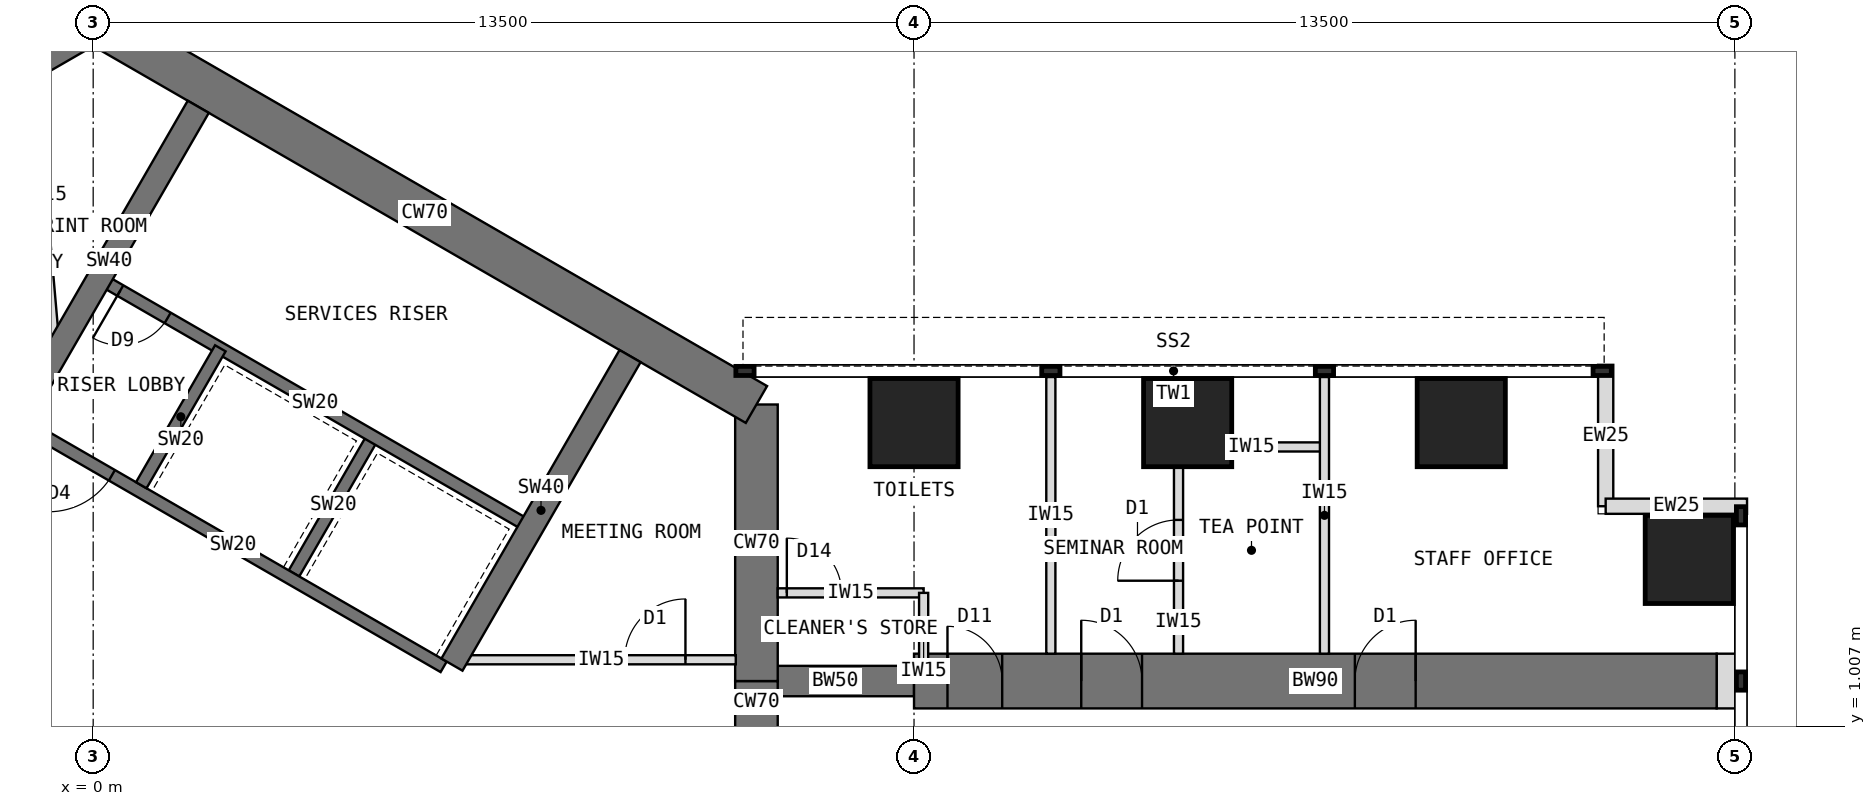
"""IFC4 building model, lengths in metres.
Left out: names, types, materials, properties, quantities, classifications, styles, units other than length and angle.
Written with IfcOpenShell. Run it as: python <this file> out.ifc"""

import sys

from ifc_helpers import new_model, si_unit, direction, frame, frame_2d, origin, origin_2d, place, context, subcontext, project, spatial, rectangle, extrude, element, fill, save


model = new_model("IFC4")
c1 = context("Model", 3, precision=1e-05, world=origin(), true_north=direction((0.0, 1.0)))
c2 = subcontext(c1, "Body", "Model", "MODEL_VIEW")
j1 = project(units=[si_unit("LENGTHUNIT", "METRE"), si_unit("PLANEANGLEUNIT", "RADIAN")], contexts=[c1])
p1 = place(None, origin())
s1 = spatial("IfcSite", under=j1, at=p1, CompositionType="ELEMENT")
p2 = place(p1, origin())
s2 = spatial("IfcBuilding", under=s1, at=p2, CompositionType="ELEMENT")
p3 = place(p2, frame((0.0, 0.0, 64.5)))
s3 = spatial("IfcBuildingStorey", under=s2, at=p3, CompositionType="ELEMENT", Elevation=64.5)
p4 = place(p3, frame((10.908, -1.75, 0.0), z_axis=(0.0, 0.0, 1.0), x_axis=(0.0, 1.0, 0.0)))
e1 = element("IfcWall", 1, at=p4, inside=s3, PredefinedType="SHEAR", context=c2, shape_type="SweptSolid", body=[
    extrude(rectangle(XDim=3.5, YDim=0.7, at=frame_2d((1.75, 0.0))), origin(), (0.0, 0.0, 1.0), 4.0),
])
p5 = place(p4, frame((0.85, 0.0, 0.0)))
e2 = element("IfcOpeningElement", 2, at=p5, cuts=e1, PredefinedType="OPENING", context=c2, shape_type="SweptSolid", body=[
    extrude(rectangle(XDim=1.8, YDim=2.1, at=frame_2d((0.9, 1.05))), frame((0.0, 0.36, 0.0), z_axis=(0.0, -1.0, 0.0), x_axis=(1.0, 0.0, 0.0)), (0.0, 0.0, 1.0), 0.72),
])
p6 = place(p3, frame((10.908, 1.75, 0.0), z_axis=(0.0, 0.0, 1.0), x_axis=(0.0, 1.0, 0.0)))
e3 = element("IfcWall", 3, at=p6, inside=s3, PredefinedType="SHEAR", context=c2, shape_type="SweptSolid", body=[
    extrude(rectangle(XDim=4.548, YDim=0.7, at=frame_2d((2.274, 0.0))), origin(), (0.0, 0.0, 1.0), 4.0),
])
p7 = place(p3, frame((10.908, 6.298, 0.0), z_axis=(0.0, 0.0, 1.0), x_axis=(-0.866021940709, 0.500005998175, 0.0)))
e4 = element("IfcWall", 4, at=p7, inside=s3, PredefinedType="SHEAR", context=c2, shape_type="SweptSolid", body=[
    extrude(rectangle(XDim=12.596, YDim=0.7, at=frame_2d((6.298, 0.0))), origin(), (0.0, 0.0, 1.0), 4.0),
])
p8 = place(p3, frame((0.0, 12.596, 0.0), z_axis=(0.0, 0.0, 1.0), x_axis=(-0.866011268655, -0.500024481964, 0.0)))
e5 = element("IfcWall", 5, at=p8, inside=s3, PredefinedType="SHEAR", context=c2, shape_type="SweptSolid", body=[
    extrude(rectangle(XDim=4.548, YDim=0.7, at=frame_2d((2.274, 0.0))), origin(), (0.0, 0.0, 1.0), 4.0),
])
p9 = place(p3, frame((10.908, 1.75, 0.0), z_axis=(0.0, 0.0, 1.0), x_axis=(1.0, 0.0, 0.0)))
e6 = element("IfcWall", 6, at=p9, inside=s3, PredefinedType="SHEAR", context=c2, shape_type="SweptSolid", body=[
    extrude(rectangle(XDim=2.592, YDim=0.5, at=frame_2d((1.296, 0.0))), origin(), (0.0, 0.0, 1.0), 4.0),
])
p10 = place(p3, frame((13.5, 1.75, 0.0), z_axis=(0.0, 0.0, 1.0), x_axis=(1.0, 0.0, 0.0)))
e7 = element("IfcWall", 7, at=p10, inside=s3, PredefinedType="SHEAR", context=c2, shape_type="SweptSolid", body=[
    extrude(rectangle(XDim=13.2, YDim=0.9, at=frame_2d((6.6, 0.0))), origin(), (0.0, 0.0, 1.0), 4.0),
])
p11 = place(p10, frame((0.55, 0.0, 0.0)))
e8 = element("IfcOpeningElement", 8, at=p11, cuts=e7, PredefinedType="OPENING", context=c2, shape_type="SweptSolid", body=[
    extrude(rectangle(XDim=0.9, YDim=2.1, at=frame_2d((0.45, 1.05))), frame((0.0, 0.46, 0.0), z_axis=(0.0, -1.0, 0.0), x_axis=(1.0, 0.0, 0.0)), (0.0, 0.0, 1.0), 0.92),
])
p12 = place(p10, frame((2.75, 0.0, 0.0)))
e9 = element("IfcOpeningElement", 9, at=p12, cuts=e7, PredefinedType="OPENING", context=c2, shape_type="SweptSolid", body=[
    extrude(rectangle(XDim=1.0, YDim=2.1, at=frame_2d((0.5, 1.05))), frame((0.0, 0.46, 0.0), z_axis=(0.0, -1.0, 0.0), x_axis=(1.0, 0.0, 0.0)), (0.0, 0.0, 1.0), 0.92),
])
p13 = place(p10, frame((7.25, 0.0, 0.0)))
e10 = element("IfcOpeningElement", 10, at=p13, cuts=e7, PredefinedType="OPENING", context=c2, shape_type="SweptSolid", body=[
    extrude(rectangle(XDim=1.0, YDim=2.1, at=frame_2d((0.5, 1.05))), frame((0.0, 0.46, 0.0), z_axis=(0.0, -1.0, 0.0), x_axis=(1.0, 0.0, 0.0)), (0.0, 0.0, 1.0), 0.92),
])
for number, where, z_axis, x_axis in (
    (11, (13.5, 6.0, 0.0), (0.0, 0.0, 1.0), (1.0, 0.0, 0.0)),
    (12, (18.0, 6.0, 0.0), (0.0, 0.0, 1.0), (1.0, 0.0, 0.0)),
    (13, (22.5, 6.0, 0.0), (0.0, 0.0, 1.0), (1.0, 0.0, 0.0)),
    (14, (26.25, 3.75, 0.0), (0.0, 0.0, 1.0), (1.0, 0.0, 0.0)),
):
    element("IfcColumn", number, at=place(p3, frame(where, z_axis=z_axis, x_axis=x_axis)), inside=s3, PredefinedType="COLUMN", context=c2, shape_type="SweptSolid", body=[
        extrude(rectangle(XDim=1.45, YDim=1.45, at=origin_2d()), origin(), (0.0, 0.0, 1.0), 4.0),
    ])
for number, where, z_axis, x_axis in (
    (15, (24.875, 6.95, 0.0), (0.0, 0.0, 1.0), (0.0, -1.0, 0.0)),
    (16, (24.875, 4.625, 0.0), (0.0, 0.0, 1.0), (1.0, 0.0, 0.0)),
):
    element("IfcWall", number, at=place(p3, frame(where, z_axis=z_axis, x_axis=x_axis)), inside=s3, PredefinedType="STANDARD", context=c2, shape_type="SweptSolid", body=[
        extrude(rectangle(XDim=2.325, YDim=0.25, at=frame_2d((1.163, 0.0))), origin(), (0.0, 0.0, 1.0), 3.8),
    ])
p14 = place(p3, frame((26.7, 1.75, 0.0), z_axis=(0.0, 0.0, 1.0), x_axis=(1.0, 0.0, 0.0)))
e17 = element("IfcWall", 17, at=p14, inside=s3, PredefinedType="PARTITIONING", context=c2, shape_type="SweptSolid", body=[
    extrude(rectangle(XDim=0.31, YDim=0.9, at=frame_2d((0.155, 0.0))), origin(), (0.0, 0.0, 1.0), 3.8),
])
p15 = place(p3, frame((5.764, 1.984, 0.0), z_axis=(0.0, 0.0, 1.0), x_axis=(-0.866026010844, 0.49999894854, 0.0)))
e18 = element("IfcWall", 18, at=p15, inside=s3, PredefinedType="SHEAR", context=c2, shape_type="SweptSolid", body=[
    extrude(rectangle(XDim=8.0, YDim=0.2, at=frame_2d((4.0, 0.0))), origin(), (0.0, 0.0, 1.0), 4.0),
])
p16 = place(p15, frame((6.3, 0.0, 0.0)))
e19 = element("IfcOpeningElement", 19, at=p16, cuts=e18, PredefinedType="OPENING", context=c2, shape_type="SweptSolid", body=[
    extrude(rectangle(XDim=1.2, YDim=2.1, at=frame_2d((0.6, 1.05))), frame((0.0, 0.11, 0.0), z_axis=(0.0, -1.0, 0.0), x_axis=(1.0, 0.0, 0.0)), (0.0, 0.0, 1.0), 0.22),
])
for number, where, z_axis, x_axis in (
    (20, (3.303, 3.52, 0.0), (0.0, 0.0, 1.0), (0.5, 0.866, 0.0)),
    (21, (0.791, 4.97, 0.0), (0.0, 0.0, 1.0), (0.5, 0.866, 0.0)),
):
    element("IfcWall", number, at=place(p3, frame(where, z_axis=z_axis, x_axis=x_axis)), inside=s3, PredefinedType="SHEAR", context=c2, shape_type="SweptSolid", body=[
        extrude(rectangle(XDim=2.6, YDim=0.2, at=frame_2d((1.3, 0.0))), origin(), (0.0, 0.0, 1.0), 4.0),
    ])
p17 = place(p3, frame((7.114, 4.322, 0.0), z_axis=(0.0, 0.0, 1.0), x_axis=(-0.866026010844, 0.49999894854, 0.0)))
e22 = element("IfcWall", 22, at=p17, inside=s3, PredefinedType="SHEAR", context=c2, shape_type="SweptSolid", body=[
    extrude(rectangle(XDim=8.0, YDim=0.2, at=frame_2d((4.0, 0.0))), origin(), (0.0, 0.0, 1.0), 4.0),
])
p18 = place(p17, frame((6.8, 0.0, 0.0)))
e23 = element("IfcOpeningElement", 23, at=p18, cuts=e22, PredefinedType="OPENING", context=c2, shape_type="SweptSolid", body=[
    extrude(rectangle(XDim=0.9, YDim=2.1, at=frame_2d((0.45, 1.05))), frame((0.0, 0.11, 0.0), z_axis=(0.0, -1.0, 0.0), x_axis=(1.0, 0.0, 0.0)), (0.0, 0.0, 1.0), 0.22),
])
for number, where, z_axis, x_axis in (
    (24, (-1.201, 6.12, 0.0), (0.0, 0.0, 1.0), (0.5, 0.866, 0.0)),
    (25, (5.901, 2.02, 0.0), (0.0, 0.0, 1.0), (0.5, 0.866, 0.0)),
):
    element("IfcWall", number, at=place(p3, frame(where, z_axis=z_axis, x_axis=x_axis)), inside=s3, PredefinedType="SHEAR", context=c2, shape_type="SweptSolid", body=[
        extrude(rectangle(XDim=5.858, YDim=0.4, at=frame_2d((2.929, 0.0))), origin(), (0.0, 0.0, 1.0), 4.0),
    ])
for number, where, z_axis, x_axis in (
    (26, (15.75, 2.2, 0.0), (0.0, 0.0, 1.0), (0.0, 1.0, 0.0)),
    (27, (20.25, 2.2, 0.0), (0.0, 0.0, 1.0), (0.0, 1.0, 0.0)),
):
    element("IfcWall", number, at=place(p3, frame(where, z_axis=z_axis, x_axis=x_axis)), inside=s3, PredefinedType="PARTITIONING", context=c2, shape_type="SweptSolid", body=[
        extrude(rectangle(XDim=4.55, YDim=0.15, at=frame_2d((2.275, 0.0))), origin(), (0.0, 0.0, 1.0), 3.8),
    ])
p19 = place(p3, frame((17.85, 5.6, 0.0), z_axis=(0.0, 0.0, 1.0), x_axis=(1.0, 0.0, 0.0)))
e28 = element("IfcWall", 28, at=p19, inside=s3, PredefinedType="PARTITIONING", context=c2, shape_type="SweptSolid", body=[
    extrude(rectangle(XDim=2.4, YDim=0.15, at=frame_2d((1.2, 0.0))), origin(), (0.0, 0.0, 1.0), 3.8),
])
p20 = place(p3, frame((17.85, 2.2, 0.0), z_axis=(0.0, 0.0, 1.0), x_axis=(0.0, 1.0, 0.0)))
e29 = element("IfcWall", 29, at=p20, inside=s3, PredefinedType="PARTITIONING", context=c2, shape_type="SweptSolid", body=[
    extrude(rectangle(XDim=3.4, YDim=0.15, at=frame_2d((1.7, 0.0))), origin(), (0.0, 0.0, 1.0), 3.8),
])
p21 = place(p20, frame((1.2, 0.0, 0.0)))
e30 = element("IfcOpeningElement", 30, at=p21, cuts=e29, PredefinedType="OPENING", context=c2, shape_type="SweptSolid", body=[
    extrude(rectangle(XDim=1.0, YDim=2.1, at=frame_2d((0.5, 1.05))), frame((0.0, 0.085, 0.0), z_axis=(0.0, -1.0, 0.0), x_axis=(1.0, 0.0, 0.0)), (0.0, 0.0, 1.0), 0.17),
])
p22 = place(p3, frame((11.258, 3.2, 0.0), z_axis=(0.0, 0.0, 1.0), x_axis=(1.0, 0.0, 0.0)))
e31 = element("IfcWall", 31, at=p22, inside=s3, PredefinedType="PARTITIONING", context=c2, shape_type="SweptSolid", body=[
    extrude(rectangle(XDim=2.4, YDim=0.15, at=frame_2d((1.2, 0.0))), origin(), (0.0, 0.0, 1.0), 3.8),
])
p23 = place(p22, frame((0.15, 0.0, 0.0)))
e32 = element("IfcOpeningElement", 32, at=p23, cuts=e31, PredefinedType="OPENING", context=c2, shape_type="SweptSolid", body=[
    extrude(rectangle(XDim=0.9, YDim=2.1, at=frame_2d((0.45, 1.05))), frame((0.0, 0.085, 0.0), z_axis=(0.0, -1.0, 0.0), x_axis=(1.0, 0.0, 0.0)), (0.0, 0.0, 1.0), 0.17),
])
p24 = place(p3, frame((13.658, 2.0, 0.0), z_axis=(0.0, 0.0, 1.0), x_axis=(0.0, 1.0, 0.0)))
e33 = element("IfcWall", 33, at=p24, inside=s3, PredefinedType="PARTITIONING", context=c2, shape_type="SweptSolid", body=[
    extrude(rectangle(XDim=1.2, YDim=0.15, at=frame_2d((0.6, 0.0))), origin(), (0.0, 0.0, 1.0), 3.8),
])
p25 = place(p3, frame((6.143, 2.1, 0.0), z_axis=(0.0, 0.0, 1.0), x_axis=(1.0, 0.0, 0.0)))
e34 = element("IfcWall", 34, at=p25, inside=s3, PredefinedType="PARTITIONING", context=c2, shape_type="SweptSolid", body=[
    extrude(rectangle(XDim=4.426, YDim=0.15, at=frame_2d((2.213, 0.0))), origin(), (0.0, 0.0, 1.0), 3.8),
])
p26 = place(p25, frame((2.598, 0.0, 0.0)))
e35 = element("IfcOpeningElement", 35, at=p26, cuts=e34, PredefinedType="OPENING", context=c2, shape_type="SweptSolid", body=[
    extrude(rectangle(XDim=1.0, YDim=2.1, at=frame_2d((0.5, 1.05))), frame((0.0, 0.085, 0.0), z_axis=(0.0, -1.0, 0.0), x_axis=(1.0, 0.0, 0.0)), (0.0, 0.0, 1.0), 0.17),
])
p27 = place(p3, frame((-0.618, 7.129, 0.0), z_axis=(0.0, 0.0, 1.0), x_axis=(-0.086409450071, 0.996259708579, 0.0)))
e36 = element("IfcWall", 36, at=p27, inside=s3, PredefinedType="PARTITIONING", context=c2, shape_type="SweptSolid", body=[
    extrude(rectangle(XDim=4.498, YDim=0.15, at=frame_2d((2.249, 0.0))), origin(), (0.0, 0.0, 1.0), 3.8),
])
p28 = place(p27, frame((2.648, 0.0, 0.0)))
e37 = element("IfcOpeningElement", 37, at=p28, cuts=e36, PredefinedType="OPENING", context=c2, shape_type="SweptSolid", body=[
    extrude(rectangle(XDim=1.0, YDim=2.1, at=frame_2d((0.5, 1.05))), frame((0.0, 0.085, 0.0), z_axis=(0.0, -1.0, 0.0), x_axis=(1.0, 0.0, 0.0)), (0.0, 0.0, 1.0), 0.17),
])
p29 = place(p16, origin())
e38 = element("IfcDoor", 38, at=p29, inside=s3, OperationType="SINGLE_SWING_RIGHT", PredefinedType="DOOR", context=c2, shape_type="SweptSolid", body=[
    extrude(rectangle(XDim=1.2, YDim=2.1, at=frame_2d((0.6, 1.05))), frame((0.0, 0.025, 0.0), z_axis=(0.0, -1.0, 0.0), x_axis=(1.0, 0.0, 0.0)), (0.0, 0.0, 1.0), 0.05),
])
fill(e19, e38)
p30 = place(p18, origin())
e39 = element("IfcDoor", 39, at=p30, inside=s3, OperationType="SINGLE_SWING_RIGHT", PredefinedType="DOOR", context=c2, shape_type="SweptSolid", body=[
    extrude(rectangle(XDim=0.9, YDim=2.1, at=frame_2d((0.45, 1.05))), frame((0.0, 0.025, 0.0), z_axis=(0.0, -1.0, 0.0), x_axis=(1.0, 0.0, 0.0)), (0.0, 0.0, 1.0), 0.05),
])
fill(e23, e39)
p31 = place(p21, origin())
e40 = element("IfcDoor", 40, at=p31, inside=s3, OperationType="SINGLE_SWING_LEFT", PredefinedType="DOOR", context=c2, shape_type="SweptSolid", body=[
    extrude(rectangle(XDim=1.0, YDim=2.1, at=frame_2d((0.5, 1.05))), frame((0.0, 0.025, 0.0), z_axis=(0.0, -1.0, 0.0), x_axis=(1.0, 0.0, 0.0)), (0.0, 0.0, 1.0), 0.05),
])
fill(e30, e40)
p32 = place(p23, origin())
e41 = element("IfcDoor", 41, at=p32, inside=s3, OperationType="SINGLE_SWING_LEFT", PredefinedType="DOOR", context=c2, shape_type="SweptSolid", body=[
    extrude(rectangle(XDim=0.9, YDim=2.1, at=frame_2d((0.45, 1.05))), frame((0.0, 0.025, 0.0), z_axis=(0.0, -1.0, 0.0), x_axis=(1.0, 0.0, 0.0)), (0.0, 0.0, 1.0), 0.05),
])
fill(e32, e41)
p33 = place(p26, origin())
e42 = element("IfcDoor", 42, at=p33, inside=s3, OperationType="SINGLE_SWING_RIGHT", PredefinedType="DOOR", context=c2, shape_type="SweptSolid", body=[
    extrude(rectangle(XDim=1.0, YDim=2.1, at=frame_2d((0.5, 1.05))), frame((0.0, 0.025, 0.0), z_axis=(0.0, -1.0, 0.0), x_axis=(1.0, 0.0, 0.0)), (0.0, 0.0, 1.0), 0.05),
])
fill(e35, e42)
p34 = place(p11, origin())
e43 = element("IfcDoor", 43, at=p34, inside=s3, OperationType="SINGLE_SWING_LEFT", PredefinedType="DOOR", context=c2, shape_type="SweptSolid", body=[
    extrude(rectangle(XDim=0.82, YDim=2.06, at=frame_2d((0.45, 1.03))), frame((0.0, 0.025, 0.0), z_axis=(0.0, -1.0, 0.0), x_axis=(1.0, 0.0, 0.0)), (0.0, 0.0, 1.0), 0.05),
    extrude(rectangle(XDim=0.04, YDim=2.1, at=frame_2d((0.02, 1.05))), frame((0.0, 0.45, 0.0), z_axis=(0.0, -1.0, 0.0), x_axis=(1.0, 0.0, 0.0)), (0.0, 0.0, 1.0), 0.899),
    extrude(rectangle(XDim=0.04, YDim=2.1, at=frame_2d((0.88, 1.05))), frame((0.0, 0.45, 0.0), z_axis=(0.0, -1.0, 0.0), x_axis=(1.0, 0.0, 0.0)), (0.0, 0.0, 1.0), 0.899),
    extrude(rectangle(XDim=0.82, YDim=0.04, at=frame_2d((0.45, 2.08))), frame((0.0, 0.45, 0.0), z_axis=(0.0, -1.0, 0.0), x_axis=(1.0, 0.0, 0.0)), (0.0, 0.0, 1.0), 0.899),
])
fill(e8, e43)
p35 = place(p12, origin())
e44 = element("IfcDoor", 44, at=p35, inside=s3, OperationType="SINGLE_SWING_LEFT", PredefinedType="DOOR", context=c2, shape_type="SweptSolid", body=[
    extrude(rectangle(XDim=0.92, YDim=2.06, at=frame_2d((0.5, 1.03))), frame((0.0, 0.025, 0.0), z_axis=(0.0, -1.0, 0.0), x_axis=(1.0, 0.0, 0.0)), (0.0, 0.0, 1.0), 0.05),
    extrude(rectangle(XDim=0.04, YDim=2.1, at=frame_2d((0.02, 1.05))), frame((0.0, 0.45, 0.0), z_axis=(0.0, -1.0, 0.0), x_axis=(1.0, 0.0, 0.0)), (0.0, 0.0, 1.0), 0.899),
    extrude(rectangle(XDim=0.04, YDim=2.1, at=frame_2d((0.98, 1.05))), frame((0.0, 0.45, 0.0), z_axis=(0.0, -1.0, 0.0), x_axis=(1.0, 0.0, 0.0)), (0.0, 0.0, 1.0), 0.899),
    extrude(rectangle(XDim=0.92, YDim=0.04, at=frame_2d((0.5, 2.08))), frame((0.0, 0.45, 0.0), z_axis=(0.0, -1.0, 0.0), x_axis=(1.0, 0.0, 0.0)), (0.0, 0.0, 1.0), 0.899),
])
fill(e9, e44)
p36 = place(p13, origin())
e45 = element("IfcDoor", 45, at=p36, inside=s3, OperationType="SINGLE_SWING_RIGHT", PredefinedType="DOOR", context=c2, shape_type="SweptSolid", body=[
    extrude(rectangle(XDim=0.92, YDim=2.06, at=frame_2d((0.5, 1.03))), frame((0.0, 0.025, 0.0), z_axis=(0.0, -1.0, 0.0), x_axis=(1.0, 0.0, 0.0)), (0.0, 0.0, 1.0), 0.05),
    extrude(rectangle(XDim=0.04, YDim=2.1, at=frame_2d((0.02, 1.05))), frame((0.0, 0.45, 0.0), z_axis=(0.0, -1.0, 0.0), x_axis=(1.0, 0.0, 0.0)), (0.0, 0.0, 1.0), 0.899),
    extrude(rectangle(XDim=0.04, YDim=2.1, at=frame_2d((0.98, 1.05))), frame((0.0, 0.45, 0.0), z_axis=(0.0, -1.0, 0.0), x_axis=(1.0, 0.0, 0.0)), (0.0, 0.0, 1.0), 0.899),
    extrude(rectangle(XDim=0.92, YDim=0.04, at=frame_2d((0.5, 2.08))), frame((0.0, 0.45, 0.0), z_axis=(0.0, -1.0, 0.0), x_axis=(1.0, 0.0, 0.0)), (0.0, 0.0, 1.0), 0.899),
])
fill(e10, e45)
save(model, sys.argv[1])
